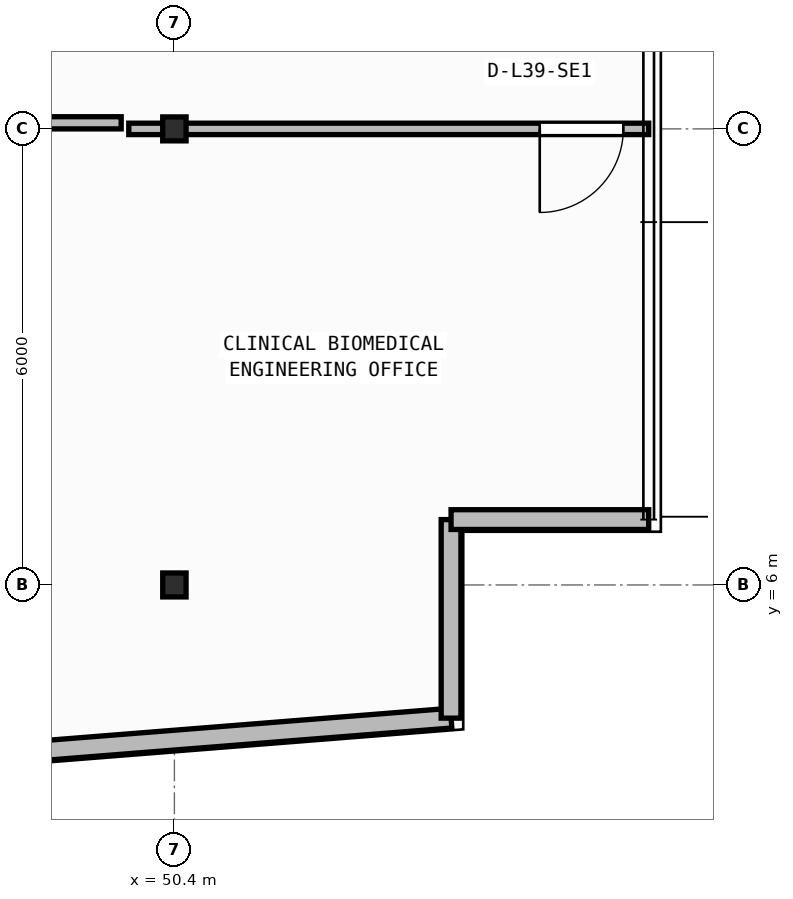
"""IFC4 building model, lengths in metres.
Left out: names, types, materials, properties, quantities, classifications, styles, units other than length and angle.
Written with IfcOpenShell. Run it as: python <this file> out.ifc"""

import sys

from ifc_helpers import new_model, si_unit, direction, frame, frame_2d, origin, origin_2d, place, context, subcontext, project, spatial, rectangle, i_section, extrude, element, fill, save


model = new_model("IFC4")
c1 = context("Model", 3, precision=1e-05, world=origin(), true_north=direction((0.0, 1.0)))
c2 = subcontext(c1, "Body", "Model", "MODEL_VIEW")
j1 = project(units=[si_unit("LENGTHUNIT", "METRE"), si_unit("PLANEANGLEUNIT", "RADIAN")], contexts=[c1])
p1 = place(None, origin())
s1 = spatial("IfcSite", under=j1, at=p1, CompositionType="ELEMENT")
p2 = place(p1, origin())
s2 = spatial("IfcBuilding", under=s1, at=p2, CompositionType="ELEMENT")
p3 = place(p2, frame((0.0, 0.0, 158.65)))
s3 = spatial("IfcBuildingStorey", under=s2, at=p3, CompositionType="ELEMENT", Elevation=158.65)
for number, where, z_axis, x_axis in (
    (1, (50.4, 6.0, 0.0), (0.0, 0.0, 1.0), (1.0, 0.0, 0.0)),
    (2, (50.4, 12.0, 0.0), (0.0, 0.0, 1.0), (1.0, 0.0, 0.0)),
):
    element("IfcColumn", number, at=place(p3, frame(where, z_axis=z_axis, x_axis=x_axis)), inside=s3, PredefinedType="COLUMN", context=c2, shape_type="SweptSolid", body=[
        extrude(i_section(OverallWidth=0.307, OverallDepth=0.315, WebThickness=0.012, FlangeThickness=0.019, FilletRadius=0.017, at=origin_2d()), origin(), (0.0, 0.0, 1.0), 3.95),
    ])
p4 = place(p3, frame((2.76, 0.173, 0.0), z_axis=(0.0, 0.0, 1.0), x_axis=(0.996857931723, 0.079210251617, 0.0)))
e3 = element("IfcWall", 3, at=p4, inside=s3, PredefinedType="STANDARD", context=c2, shape_type="SweptSolid", body=[
    extrude(rectangle(XDim=51.442, YDim=0.26, at=frame_2d((25.721, 0.0))), origin(), (0.0, 0.0, 1.0), 3.71),
])
p5 = place(p4, frame((24.521, 0.0, 0.9)))
e4 = element("IfcOpeningElement", 4, at=p5, cuts=e3, PredefinedType="OPENING", context=c2, shape_type="SweptSolid", body=[
    extrude(rectangle(XDim=2.4, YDim=1.65, at=frame_2d((1.2, 0.825))), frame((0.0, 0.14, 0.0), z_axis=(0.0, -1.0, 0.0), x_axis=(1.0, 0.0, 0.0)), (0.0, 0.0, 1.0), 0.28),
])
p6 = place(p3, frame((54.04, 4.248, 0.0), z_axis=(0.0, 0.0, 1.0), x_axis=(0.0, 1.0, 0.0)))
e5 = element("IfcWall", 5, at=p6, inside=s3, PredefinedType="STANDARD", context=c2, shape_type="SweptSolid", body=[
    extrude(rectangle(XDim=2.612, YDim=0.26, at=frame_2d((1.306, 0.0))), origin(), (0.0, 0.0, 1.0), 3.71),
])
p7 = place(p3, frame((54.04, 6.86, 0.0), z_axis=(0.0, 0.0, 1.0), x_axis=(1.0, 0.0, 0.0)))
e6 = element("IfcWall", 6, at=p7, inside=s3, PredefinedType="STANDARD", context=c2, shape_type="SweptSolid", body=[
    extrude(rectangle(XDim=2.6, YDim=0.26, at=frame_2d((1.3, 0.0))), origin(), (0.0, 0.0, 1.0), 3.71),
])
p8 = place(p3, frame((56.64, 12.0, 0.0), z_axis=(0.0, 0.0, 1.0), x_axis=(-1.0, 0.0, 0.0)))
e7 = element("IfcWall", 7, at=p8, inside=s3, PredefinedType="PARTITIONING", context=c2, shape_type="SweptSolid", body=[
    extrude(rectangle(XDim=6.84, YDim=0.15, at=frame_2d((3.42, 0.0))), origin(), (0.0, 0.0, 1.0), 3.083),
])
p9 = place(p8, frame((0.333, 0.0, 0.0)))
e8 = element("IfcOpeningElement", 8, at=p9, cuts=e7, PredefinedType="OPENING", context=c2, shape_type="SweptSolid", body=[
    extrude(rectangle(XDim=1.1, YDim=2.1, at=frame_2d((0.55, 1.05))), frame((0.0, 0.085, 0.0), z_axis=(0.0, -1.0, 0.0), x_axis=(1.0, 0.0, 0.0)), (0.0, 0.0, 1.0), 0.17),
])
p10 = place(p3, frame((46.689, 12.08, 0.0), z_axis=(0.0, 0.0, 1.0), x_axis=(1.0, 0.0, 0.0)))
e9 = element("IfcWall", 9, at=p10, inside=s3, PredefinedType="PARTITIONING", context=c2, shape_type="SweptSolid", body=[
    extrude(rectangle(XDim=3.011, YDim=0.16, at=frame_2d((1.505, 0.0))), origin(), (0.0, 0.0, 1.0), 3.083),
])
p11 = place(p9, origin())
e10 = element("IfcDoor", 10, at=p11, inside=s3, OperationType="SINGLE_SWING_RIGHT", PredefinedType="DOOR", context=c2, shape_type="SweptSolid", body=[
    extrude(rectangle(XDim=1.1, YDim=2.1, at=frame_2d((0.55, 1.05))), frame((0.0, 0.025, 0.0), z_axis=(0.0, -1.0, 0.0), x_axis=(1.0, 0.0, 0.0)), (0.0, 0.0, 1.0), 0.05),
])
fill(e8, e10)
save(model, sys.argv[1])
